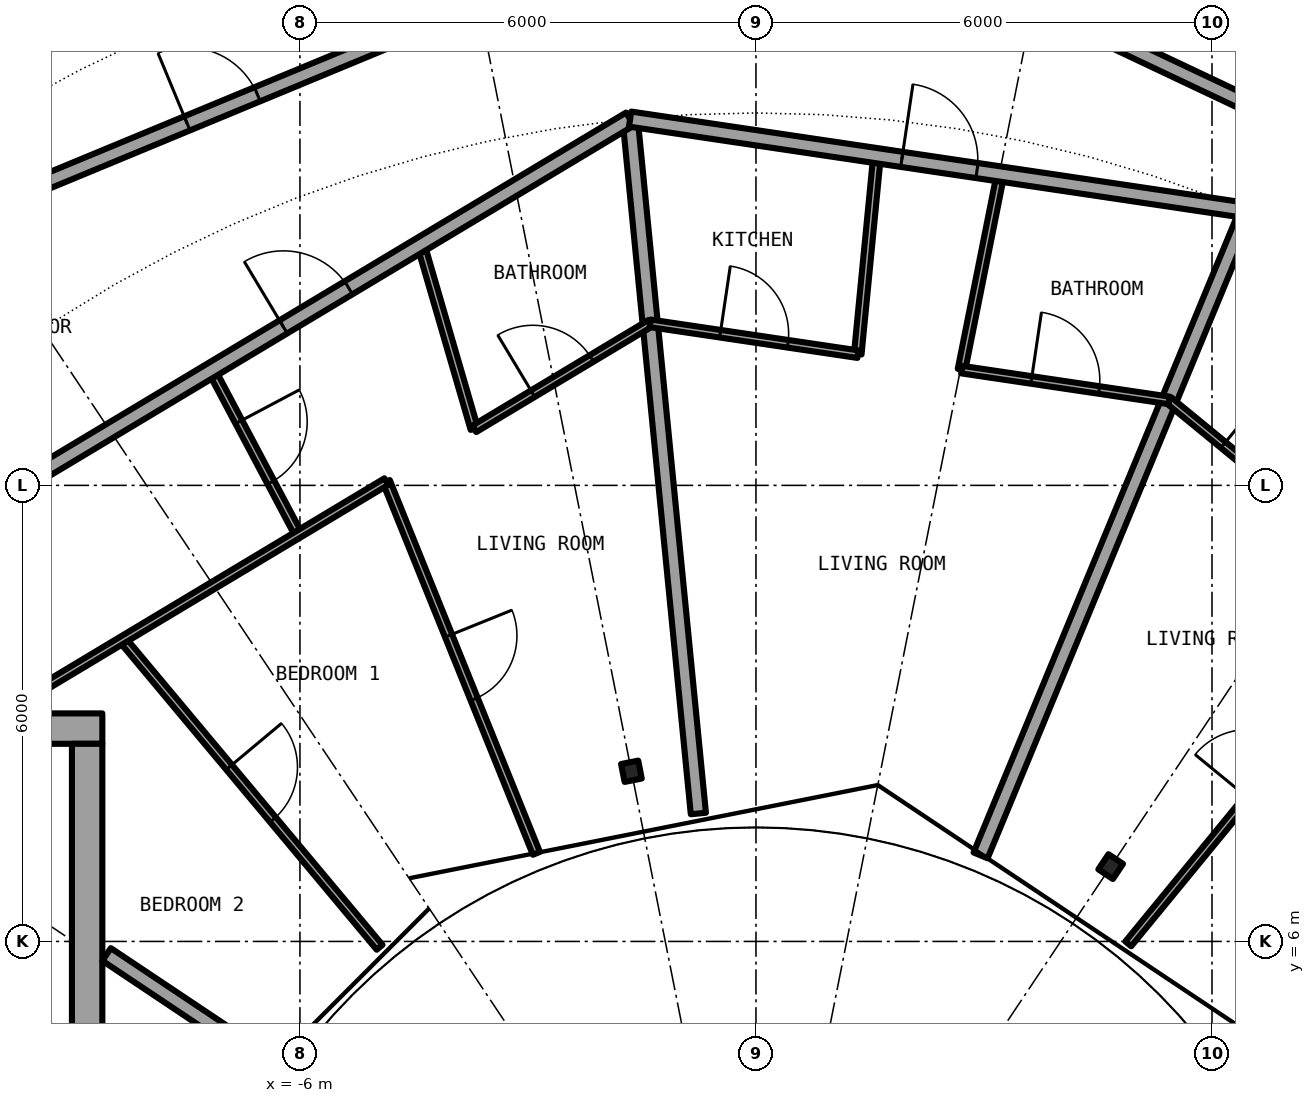
"""IFC4 building model, lengths in metres.
Left out: names, types, materials, properties, quantities, classifications, styles, units other than length and angle.
Written with IfcOpenShell. Run it as: python <this file> out.ifc"""

import sys

from ifc_helpers import new_model, si_unit, direction, frame, frame_2d, origin, origin_2d, place, context, subcontext, project, spatial, rectangle, i_section, extrude, element, fill, save


model = new_model("IFC4")
c1 = context("Model", 3, precision=1e-05, world=origin(), true_north=direction((0.0, 1.0)))
c2 = subcontext(c1, "Body", "Model", "MODEL_VIEW")
j1 = project(units=[si_unit("LENGTHUNIT", "METRE"), si_unit("PLANEANGLEUNIT", "RADIAN")], contexts=[c1])
p1 = place(None, origin())
s1 = spatial("IfcSite", under=j1, at=p1, CompositionType="ELEMENT")
p2 = place(p1, origin())
s2 = spatial("IfcBuilding", under=s1, at=p2, CompositionType="ELEMENT")
p3 = place(p2, frame((0.0, 0.0, 249.3)))
s3 = spatial("IfcBuildingStorey", under=s2, at=p3, CompositionType="ELEMENT", Elevation=249.3)
for number, where, z_axis, x_axis in (
    (1, (4.667, 6.984, 0.0), (0.0, 0.0, 1.0), (0.556, 0.831, 0.0)),
    (2, (-1.639, 8.239, 0.0), (0.0, 0.0, 1.0), (-0.195, 0.981, 0.0)),
):
    element("IfcColumn", number, at=place(p3, frame(where, z_axis=z_axis, x_axis=x_axis)), inside=s3, PredefinedType="COLUMN", context=c2, shape_type="SweptSolid", body=[
        extrude(i_section(OverallWidth=0.24, OverallDepth=0.23, WebThickness=0.008, FlangeThickness=0.012, FilletRadius=0.021, at=origin_2d()), origin(), (0.0, 0.0, 1.0), 3.05),
    ])
p4 = place(p3, frame((-8.6, 8.8, 0.0), z_axis=(0.0, 0.0, 1.0), x_axis=(-1.0, 0.0, 0.0)))
e3 = element("IfcWall", 3, at=p4, inside=s3, PredefinedType="SHEAR", context=c2, shape_type="SweptSolid", body=[
    extrude(rectangle(XDim=12.5, YDim=0.4, at=frame_2d((6.25, 0.0))), origin(), (0.0, 0.0, 1.0), 3.05),
])
p5 = place(p4, frame((10.825, 0.0, 0.0)))
e4 = element("IfcOpeningElement", 4, at=p5, cuts=e3, PredefinedType="OPENING", context=c2, shape_type="SweptSolid", body=[
    extrude(rectangle(XDim=1.2, YDim=2.3, at=frame_2d((0.6, 1.15))), frame((0.0, 0.21, 0.0), z_axis=(0.0, -1.0, 0.0), x_axis=(1.0, 0.0, 0.0)), (0.0, 0.0, 1.0), 0.42),
])
p6 = place(p3, frame((-8.8, 8.6, 0.0), z_axis=(0.0, 0.0, 1.0), x_axis=(0.0, -1.0, 0.0)))
e5 = element("IfcWall", 5, at=p6, inside=s3, PredefinedType="SHEAR", context=c2, shape_type="SweptSolid", body=[
    extrude(rectangle(XDim=17.2, YDim=0.4, at=frame_2d((8.6, 0.0))), origin(), (0.0, 0.0, 1.0), 3.05),
])
p7 = place(p6, frame((7.4, 0.0, 0.1)))
e6 = element("IfcOpeningElement", 6, at=p7, cuts=e5, PredefinedType="OPENING", context=c2, shape_type="SweptSolid", body=[
    extrude(rectangle(XDim=2.4, YDim=2.2, at=frame_2d((1.2, 1.1))), frame((0.0, 0.21, 0.0), z_axis=(0.0, -1.0, 0.0), x_axis=(1.0, 0.0, 0.0)), (0.0, 0.0, 1.0), 0.42),
])
p8 = place(p3, frame((-8.335, 9.97, 0.0), z_axis=(0.0, 0.0, 1.0), x_axis=(0.641376424834, -0.767226356213, 0.0)))
e7 = element("IfcWall", 7, at=p8, inside=s3, PredefinedType="PARTITIONING", context=c2, shape_type="SweptSolid", body=[
    extrude(rectangle(XDim=5.275, YDim=0.1, at=frame_2d((2.637, 0.0))), origin(), (0.0, 0.0, 1.0), 2.7),
])
p9 = place(p8, frame((2.187, 0.0, 0.0)))
e8 = element("IfcOpeningElement", 8, at=p9, cuts=e7, PredefinedType="OPENING", context=c2, shape_type="SweptSolid", body=[
    extrude(rectangle(XDim=0.9, YDim=2.3, at=frame_2d((0.45, 1.15))), frame((0.0, 0.06, 0.0), z_axis=(0.0, -1.0, 0.0), x_axis=(1.0, 0.0, 0.0)), (0.0, 0.0, 1.0), 0.12),
])
p10 = place(p3, frame((-7.166, 13.517, 0.0), z_axis=(0.0, 0.0, 1.0), x_axis=(0.468337293896, -0.883549760425, 0.0)))
e9 = element("IfcWall", 9, at=p10, inside=s3, PredefinedType="PARTITIONING", context=c2, shape_type="SweptSolid", body=[
    extrude(rectangle(XDim=2.445, YDim=0.1, at=frame_2d((1.222, 0.0))), origin(), (0.0, 0.0, 1.0), 2.7),
])
p11 = place(p10, frame((0.772, 0.0, 0.0)))
e10 = element("IfcOpeningElement", 10, at=p11, cuts=e9, PredefinedType="OPENING", context=c2, shape_type="SweptSolid", body=[
    extrude(rectangle(XDim=0.9, YDim=2.3, at=frame_2d((0.45, 1.15))), frame((0.0, 0.06, 0.0), z_axis=(0.0, -1.0, 0.0), x_axis=(1.0, 0.0, 0.0)), (0.0, 0.0, 1.0), 0.12),
])
p12 = place(p3, frame((-4.864, 12.051, 0.0), z_axis=(0.0, 0.0, 1.0), x_axis=(0.374372761824, -0.927278294367, 0.0)))
e11 = element("IfcWall", 11, at=p12, inside=s3, PredefinedType="PARTITIONING", context=c2, shape_type="SweptSolid", body=[
    extrude(rectangle(XDim=5.276, YDim=0.1, at=frame_2d((2.638, 0.0))), origin(), (0.0, 0.0, 1.0), 2.7),
])
p13 = place(p12, frame((2.188, 0.0, 0.0)))
e12 = element("IfcOpeningElement", 12, at=p13, cuts=e11, PredefinedType="OPENING", context=c2, shape_type="SweptSolid", body=[
    extrude(rectangle(XDim=0.9, YDim=2.3, at=frame_2d((0.45, 1.15))), frame((0.0, 0.06, 0.0), z_axis=(0.0, -1.0, 0.0), x_axis=(1.0, 0.0, 0.0)), (0.0, 0.0, 1.0), 0.12),
])
p14 = place(p3, frame((-4.411, 15.168, 0.0), z_axis=(0.0, 0.0, 1.0), x_axis=(0.279201466266, -0.960232545395, 0.0)))
e13 = element("IfcWall", 13, at=p14, inside=s3, PredefinedType="PARTITIONING", context=c2, shape_type="SweptSolid", body=[
    extrude(rectangle(XDim=2.524, YDim=0.1, at=frame_2d((1.262, 0.0))), origin(), (0.0, 0.0, 1.0), 2.7),
])
p15 = place(p3, frame((-1.656, 16.819, 0.0), z_axis=(0.0, 0.0, 1.0), x_axis=(0.097815726767, -0.995204543597, 0.0)))
e14 = element("IfcWall", 14, at=p15, inside=s3, PredefinedType="PARTITIONING", context=c2, shape_type="SweptSolid", body=[
    extrude(rectangle(XDim=9.18, YDim=0.2, at=frame_2d((4.59, 0.0))), origin(), (0.0, 0.0, 1.0), 2.7),
])
p16 = place(p3, frame((1.339, 13.727, 0.0), z_axis=(0.0, 0.0, 1.0), x_axis=(0.096830025237, 0.995300932489, 0.0)))
e15 = element("IfcWall", 15, at=p16, inside=s3, PredefinedType="PARTITIONING", context=c2, shape_type="SweptSolid", body=[
    extrude(rectangle(XDim=2.622, YDim=0.1, at=frame_2d((1.311, 0.0))), origin(), (0.0, 0.0, 1.0), 2.7),
])
p17 = place(p3, frame((2.704, 13.524, 0.0), z_axis=(0.0, 0.0, 1.0), x_axis=(0.195937128464, 0.980616460034, 0.0)))
e16 = element("IfcWall", 16, at=p17, inside=s3, PredefinedType="PARTITIONING", context=c2, shape_type="SweptSolid", body=[
    extrude(rectangle(XDim=2.623, YDim=0.1, at=frame_2d((1.312, 0.0))), origin(), (0.0, 0.0, 1.0), 2.7),
])
p18 = place(p3, frame((2.955, 7.132, 0.0), z_axis=(0.0, 0.0, 1.0), x_axis=(0.382556139466, 0.923932248683, 0.0)))
e17 = element("IfcWall", 17, at=p18, inside=s3, PredefinedType="PARTITIONING", context=c2, shape_type="SweptSolid", body=[
    extrude(rectangle(XDim=9.18, YDim=0.2, at=frame_2d((4.59, 0.0))), origin(), (0.0, 0.0, 1.0), 2.7),
])
p19 = place(p3, frame((4.898, 5.968, 0.0), z_axis=(0.0, 0.0, 1.0), x_axis=(0.634358693064, 0.773038840249, 0.0)))
e18 = element("IfcWall", 18, at=p19, inside=s3, PredefinedType="PARTITIONING", context=c2, shape_type="SweptSolid", body=[
    extrude(rectangle(XDim=5.868, YDim=0.1, at=frame_2d((2.934, 0.0))), origin(), (0.0, 0.0, 1.0), 2.7),
])
p20 = place(p19, frame((2.484, 0.0, 0.0)))
e19 = element("IfcOpeningElement", 19, at=p20, cuts=e18, PredefinedType="OPENING", context=c2, shape_type="SweptSolid", body=[
    extrude(rectangle(XDim=0.9, YDim=2.3, at=frame_2d((0.45, 1.15))), frame((0.0, 0.06, 0.0), z_axis=(0.0, -1.0, 0.0), x_axis=(1.0, 0.0, 0.0)), (0.0, 0.0, 1.0), 0.12),
])
p21 = place(p3, frame((-6.513, 4.472, 0.0), z_axis=(0.0, 0.0, 1.0), x_axis=(-0.831450132577, 0.555599385382, 0.0)))
e20 = element("IfcWall", 20, at=p21, inside=s3, PredefinedType="PARTITIONING", context=c2, shape_type="SweptSolid", body=[
    extrude(rectangle(XDim=2.443, YDim=0.2, at=frame_2d((1.221, 0.0))), origin(), (0.0, 0.0, 1.0), 2.7),
])
p22 = place(p3, frame((-9.955, 8.996, 0.0), z_axis=(0.0, 0.0, 1.0), x_axis=(0.857587239633, 0.514338532894, 0.0)))
e21 = element("IfcWall", 21, at=p22, inside=s3, PredefinedType="PARTITIONING", context=c2, shape_type="SweptSolid", body=[
    extrude(rectangle(XDim=5.938, YDim=0.1, at=frame_2d((2.969, 0.0))), origin(), (0.0, 0.0, 1.0), 2.7),
])
p23 = place(p3, frame((-3.706, 12.744, 0.0), z_axis=(0.0, 0.0, 1.0), x_axis=(0.857524856518, 0.514442533674, 0.0)))
e22 = element("IfcWall", 22, at=p23, inside=s3, PredefinedType="PARTITIONING", context=c2, shape_type="SweptSolid", body=[
    extrude(rectangle(XDim=2.698, YDim=0.1, at=frame_2d((1.349, 0.0))), origin(), (0.0, 0.0, 1.0), 2.7),
])
p24 = place(p23, frame((0.899, 0.0, 0.0)))
e23 = element("IfcOpeningElement", 23, at=p24, cuts=e22, PredefinedType="OPENING", context=c2, shape_type="SweptSolid", body=[
    extrude(rectangle(XDim=0.9, YDim=2.3, at=frame_2d((0.45, 1.15))), frame((0.0, 0.06, 0.0), z_axis=(0.0, -1.0, 0.0), x_axis=(1.0, 0.0, 0.0)), (0.0, 0.0, 1.0), 0.12),
])
p25 = place(p3, frame((5.431, 13.12, 0.0), z_axis=(0.0, 0.0, 1.0), x_axis=(0.773149312811, -0.634224045665, 0.0)))
e24 = element("IfcWall", 24, at=p25, inside=s3, PredefinedType="PARTITIONING", context=c2, shape_type="SweptSolid", body=[
    extrude(rectangle(XDim=2.749, YDim=0.1, at=frame_2d((1.374, 0.0))), origin(), (0.0, 0.0, 1.0), 2.7),
])
p26 = place(p25, frame((0.927, 0.0, 0.0)))
e25 = element("IfcOpeningElement", 25, at=p26, cuts=e24, PredefinedType="OPENING", context=c2, shape_type="SweptSolid", body=[
    extrude(rectangle(XDim=0.9, YDim=2.3, at=frame_2d((0.45, 1.15))), frame((0.0, 0.06, 0.0), z_axis=(0.0, -1.0, 0.0), x_axis=(1.0, 0.0, 0.0)), (0.0, 0.0, 1.0), 0.12),
])
p27 = place(p3, frame((-1.392, 14.132, 0.0), z_axis=(0.0, 0.0, 1.0), x_axis=(0.989153611195, -0.146884762516, 0.0)))
e26 = element("IfcWall", 26, at=p27, inside=s3, PredefinedType="PARTITIONING", context=c2, shape_type="SweptSolid", body=[
    extrude(rectangle(XDim=2.764, YDim=0.1, at=frame_2d((1.382, 0.0))), origin(), (0.0, 0.0, 1.0), 2.7),
])
p28 = place(p27, frame((0.932, 0.0, 0.0)))
e27 = element("IfcOpeningElement", 27, at=p28, cuts=e26, PredefinedType="OPENING", context=c2, shape_type="SweptSolid", body=[
    extrude(rectangle(XDim=0.9, YDim=2.3, at=frame_2d((0.45, 1.15))), frame((0.0, 0.06, 0.0), z_axis=(0.0, -1.0, 0.0), x_axis=(1.0, 0.0, 0.0)), (0.0, 0.0, 1.0), 0.12),
])
p29 = place(p3, frame((2.707, 13.523, 0.0), z_axis=(0.0, 0.0, 1.0), x_axis=(0.98916494308, -0.146808430897, 0.0)))
e28 = element("IfcWall", 28, at=p29, inside=s3, PredefinedType="PARTITIONING", context=c2, shape_type="SweptSolid", body=[
    extrude(rectangle(XDim=2.759, YDim=0.1, at=frame_2d((1.379, 0.0))), origin(), (0.0, 0.0, 1.0), 2.7),
])
p30 = place(p29, frame((0.927, 0.0, 0.0)))
e29 = element("IfcOpeningElement", 29, at=p30, cuts=e28, PredefinedType="OPENING", context=c2, shape_type="SweptSolid", body=[
    extrude(rectangle(XDim=0.9, YDim=2.3, at=frame_2d((0.45, 1.15))), frame((0.0, 0.06, 0.0), z_axis=(0.0, -1.0, 0.0), x_axis=(1.0, 0.0, 0.0)), (0.0, 0.0, 1.0), 0.12),
])
p31 = place(p3, frame((-14.052, 9.389, 0.0), z_axis=(0.0, 0.0, 1.0), x_axis=(0.857683679102, 0.51417769944, 0.0)))
e30 = element("IfcWall", 30, at=p31, inside=s3, PredefinedType="PARTITIONING", context=c2, shape_type="SweptSolid", body=[
    extrude(rectangle(XDim=14.451, YDim=0.2, at=frame_2d((7.225, 0.0))), origin(), (0.0, 0.0, 1.0), 2.7),
])
p32 = place(p31, frame((9.134, 0.0, 0.0)))
e31 = element("IfcOpeningElement", 31, at=p32, cuts=e30, PredefinedType="OPENING", context=c2, shape_type="SweptSolid", body=[
    extrude(rectangle(XDim=1.0, YDim=2.3, at=frame_2d((0.5, 1.15))), frame((0.0, 0.11, 0.0), z_axis=(0.0, -1.0, 0.0), x_axis=(1.0, 0.0, 0.0)), (0.0, 0.0, 1.0), 0.22),
])
p33 = place(p3, frame((-1.656, 16.819, 0.0), z_axis=(0.0, 0.0, 1.0), x_axis=(0.989174071716, -0.146746910856, 0.0)))
e32 = element("IfcWall", 32, at=p33, inside=s3, PredefinedType="PARTITIONING", context=c2, shape_type="SweptSolid", body=[
    extrude(rectangle(XDim=8.212, YDim=0.2, at=frame_2d((4.106, 0.0))), origin(), (0.0, 0.0, 1.0), 2.7),
])
p34 = place(p33, frame((3.614, 0.0, 0.0)))
e33 = element("IfcOpeningElement", 33, at=p34, cuts=e32, PredefinedType="OPENING", context=c2, shape_type="SweptSolid", body=[
    extrude(rectangle(XDim=1.0, YDim=2.3, at=frame_2d((0.5, 1.15))), frame((0.0, 0.11, 0.0), z_axis=(0.0, -1.0, 0.0), x_axis=(1.0, 0.0, 0.0)), (0.0, 0.0, 1.0), 0.22),
])
p35 = place(p3, frame((3.65, 18.351, 0.0), z_axis=(0.0, 0.0, 1.0), x_axis=(0.904027935406, -0.427473381634, 0.0)))
e34 = element("IfcWall", 34, at=p35, inside=s3, PredefinedType="PARTITIONING", context=c2, shape_type="SweptSolid", body=[
    extrude(rectangle(XDim=9.093, YDim=0.2, at=frame_2d((4.546, 0.0))), origin(), (0.0, 0.0, 1.0), 2.7),
])
p36 = place(p35, frame((4.046, 0.0, 0.0)))
e35 = element("IfcOpeningElement", 35, at=p36, cuts=e34, PredefinedType="OPENING", context=c2, shape_type="SweptSolid", body=[
    extrude(rectangle(XDim=1.0, YDim=2.3, at=frame_2d((0.5, 1.15))), frame((0.0, 0.11, 0.0), z_axis=(0.0, -1.0, 0.0), x_axis=(1.0, 0.0, 0.0)), (0.0, 0.0, 1.0), 0.22),
])
p37 = place(p3, frame((-10.395, 15.557, 0.0), z_axis=(0.0, 0.0, 1.0), x_axis=(0.923866436038, 0.382715048518, 0.0)))
e36 = element("IfcWall", 36, at=p37, inside=s3, PredefinedType="PARTITIONING", context=c2, shape_type="SweptSolid", body=[
    extrude(rectangle(XDim=7.301, YDim=0.2, at=frame_2d((3.65, 0.0))), origin(), (0.0, 0.0, 1.0), 2.7),
])
p38 = place(p37, frame((3.15, 0.0, 0.0)))
e37 = element("IfcOpeningElement", 37, at=p38, cuts=e36, PredefinedType="OPENING", context=c2, shape_type="SweptSolid", body=[
    extrude(rectangle(XDim=1.0, YDim=2.3, at=frame_2d((0.5, 1.15))), frame((0.0, 0.11, 0.0), z_axis=(0.0, -1.0, 0.0), x_axis=(1.0, 0.0, 0.0)), (0.0, 0.0, 1.0), 0.22),
])
p39 = place(p38, origin())
e38 = element("IfcDoor", 38, at=p39, inside=s3, OperationType="SINGLE_SWING_LEFT", PredefinedType="DOOR", context=c2, shape_type="SweptSolid", body=[
    extrude(rectangle(XDim=1.0, YDim=2.3, at=frame_2d((0.5, 1.15))), frame((0.0, 0.025, 0.0), z_axis=(0.0, -1.0, 0.0), x_axis=(1.0, 0.0, 0.0)), (0.0, 0.0, 1.0), 0.05),
])
fill(e37, e38)
p40 = place(p26, origin())
e39 = element("IfcDoor", 39, at=p40, inside=s3, OperationType="SINGLE_SWING_RIGHT", PredefinedType="DOOR", context=c2, shape_type="SweptSolid", body=[
    extrude(rectangle(XDim=0.9, YDim=2.3, at=frame_2d((0.45, 1.15))), frame((0.0, 0.025, 0.0), z_axis=(0.0, -1.0, 0.0), x_axis=(1.0, 0.0, 0.0)), (0.0, 0.0, 1.0), 0.05),
])
fill(e25, e39)
p41 = place(p34, origin())
e40 = element("IfcDoor", 40, at=p41, inside=s3, OperationType="SINGLE_SWING_RIGHT", PredefinedType="DOOR", context=c2, shape_type="SweptSolid", body=[
    extrude(rectangle(XDim=1.0, YDim=2.3, at=frame_2d((0.5, 1.15))), frame((0.0, 0.025, 0.0), z_axis=(0.0, -1.0, 0.0), x_axis=(1.0, 0.0, 0.0)), (0.0, 0.0, 1.0), 0.05),
])
fill(e33, e40)
p42 = place(p30, origin())
e41 = element("IfcDoor", 41, at=p42, inside=s3, OperationType="SINGLE_SWING_LEFT", PredefinedType="DOOR", context=c2, shape_type="SweptSolid", body=[
    extrude(rectangle(XDim=0.9, YDim=2.3, at=frame_2d((0.45, 1.15))), frame((0.0, 0.025, 0.0), z_axis=(0.0, -1.0, 0.0), x_axis=(1.0, 0.0, 0.0)), (0.0, 0.0, 1.0), 0.05),
])
fill(e29, e41)
p43 = place(p28, origin())
e42 = element("IfcDoor", 42, at=p43, inside=s3, OperationType="SINGLE_SWING_RIGHT", PredefinedType="DOOR", context=c2, shape_type="SweptSolid", body=[
    extrude(rectangle(XDim=0.9, YDim=2.3, at=frame_2d((0.45, 1.15))), frame((0.0, 0.025, 0.0), z_axis=(0.0, -1.0, 0.0), x_axis=(1.0, 0.0, 0.0)), (0.0, 0.0, 1.0), 0.05),
])
fill(e27, e42)
p44 = place(p32, origin())
e43 = element("IfcDoor", 43, at=p44, inside=s3, OperationType="SINGLE_SWING_RIGHT", PredefinedType="DOOR", context=c2, shape_type="SweptSolid", body=[
    extrude(rectangle(XDim=1.0, YDim=2.3, at=frame_2d((0.5, 1.15))), frame((0.0, 0.025, 0.0), z_axis=(0.0, -1.0, 0.0), x_axis=(1.0, 0.0, 0.0)), (0.0, 0.0, 1.0), 0.05),
])
fill(e31, e43)
p45 = place(p24, origin())
e44 = element("IfcDoor", 44, at=p45, inside=s3, OperationType="SINGLE_SWING_RIGHT", PredefinedType="DOOR", context=c2, shape_type="SweptSolid", body=[
    extrude(rectangle(XDim=0.9, YDim=2.3, at=frame_2d((0.45, 1.15))), frame((0.0, 0.025, 0.0), z_axis=(0.0, -1.0, 0.0), x_axis=(1.0, 0.0, 0.0)), (0.0, 0.0, 1.0), 0.05),
])
fill(e23, e44)
p46 = place(p11, origin())
e45 = element("IfcDoor", 45, at=p46, inside=s3, OperationType="SINGLE_SWING_LEFT", PredefinedType="DOOR", context=c2, shape_type="SweptSolid", body=[
    extrude(rectangle(XDim=0.9, YDim=2.3, at=frame_2d((0.45, 1.15))), frame((0.0, 0.025, 0.0), z_axis=(0.0, -1.0, 0.0), x_axis=(1.0, 0.0, 0.0)), (0.0, 0.0, 1.0), 0.05),
])
fill(e10, e45)
p47 = place(p13, origin())
e46 = element("IfcDoor", 46, at=p47, inside=s3, OperationType="SINGLE_SWING_RIGHT", PredefinedType="DOOR", context=c2, shape_type="SweptSolid", body=[
    extrude(rectangle(XDim=0.9, YDim=2.3, at=frame_2d((0.45, 1.15))), frame((0.0, 0.025, 0.0), z_axis=(0.0, -1.0, 0.0), x_axis=(1.0, 0.0, 0.0)), (0.0, 0.0, 1.0), 0.05),
])
fill(e12, e46)
p48 = place(p9, origin())
e47 = element("IfcDoor", 47, at=p48, inside=s3, OperationType="SINGLE_SWING_RIGHT", PredefinedType="DOOR", context=c2, shape_type="SweptSolid", body=[
    extrude(rectangle(XDim=0.9, YDim=2.3, at=frame_2d((0.45, 1.15))), frame((0.0, 0.025, 0.0), z_axis=(0.0, -1.0, 0.0), x_axis=(1.0, 0.0, 0.0)), (0.0, 0.0, 1.0), 0.05),
])
fill(e8, e47)
save(model, sys.argv[1])
